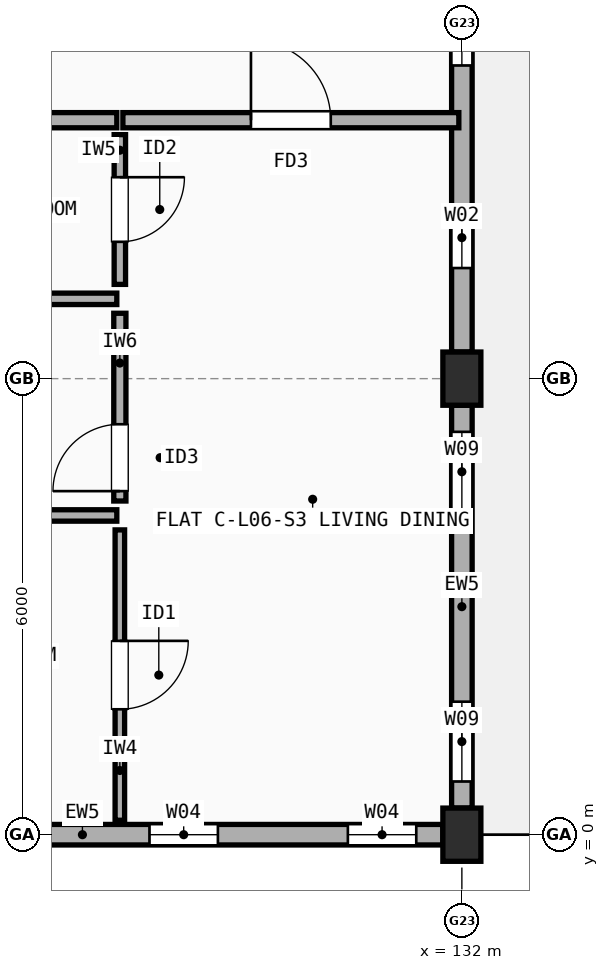
"""IFC4 building model, lengths in metres.
Left out: names, types, materials, properties, quantities, classifications, styles, units other than length and angle.
Written with IfcOpenShell. Run it as: python <this file> out.ifc"""

import sys

from ifc_helpers import new_model, si_unit, direction, frame, frame_2d, origin, origin_2d, place, context, subcontext, project, spatial, rectangle, extrude, element, fill, save


model = new_model("IFC4")
c1 = context("Model", 3, precision=1e-05, world=origin(), true_north=direction((0.0, 1.0)))
c2 = subcontext(c1, "Body", "Model", "MODEL_VIEW")
j1 = project(units=[si_unit("LENGTHUNIT", "METRE"), si_unit("PLANEANGLEUNIT", "RADIAN")], contexts=[c1])
p1 = place(None, origin())
s1 = spatial("IfcSite", under=j1, at=p1, CompositionType="ELEMENT")
p2 = place(p1, origin())
s2 = spatial("IfcBuilding", under=s1, at=p2, CompositionType="ELEMENT")
p3 = place(p2, frame((0.0, 0.0, 20.5)))
s3 = spatial("IfcBuildingStorey", under=s2, at=p3, CompositionType="ELEMENT", Elevation=20.5)
for number, where, z_axis, x_axis in (
    (1, (132.0, 0.0, 0.0), (0.0, 0.0, 1.0), (1.0, 0.0, 0.0)),
    (2, (132.0, 6.0, 0.0), (0.0, 0.0, 1.0), (1.0, 0.0, 0.0)),
):
    element("IfcColumn", number, at=place(p3, frame(where, z_axis=z_axis, x_axis=x_axis)), inside=s3, PredefinedType="COLUMN", context=c2, shape_type="SweptSolid", body=[
        extrude(rectangle(XDim=0.5, YDim=0.7, at=origin_2d()), origin(), (0.0, 0.0, 1.0), 2.97),
    ])
p4 = place(p3, frame((126.275, 0.0, 0.0), z_axis=(0.0, 0.0, 1.0), x_axis=(1.0, 0.0, 0.0)))
e3 = element("IfcWall", 3, at=p4, inside=s3, PredefinedType="STANDARD", context=c2, shape_type="SweptSolid", body=[
    extrude(rectangle(XDim=5.475, YDim=0.27, at=frame_2d((2.738, 0.0))), origin(), (0.0, 0.0, 1.0), 2.452),
])
p5 = place(p4, frame((1.615, 0.0, 0.9)))
e4 = element("IfcOpeningElement", 4, at=p5, cuts=e3, PredefinedType="OPENING", context=c2, shape_type="SweptSolid", body=[
    extrude(rectangle(XDim=0.9, YDim=1.3, at=frame_2d((0.45, 0.65))), frame((0.0, 0.145, 0.0), z_axis=(0.0, -1.0, 0.0), x_axis=(1.0, 0.0, 0.0)), (0.0, 0.0, 1.0), 0.29),
])
p6 = place(p4, frame((4.225, 0.0, 0.9)))
e5 = element("IfcOpeningElement", 5, at=p6, cuts=e3, PredefinedType="OPENING", context=c2, shape_type="SweptSolid", body=[
    extrude(rectangle(XDim=0.9, YDim=1.3, at=frame_2d((0.45, 0.65))), frame((0.0, 0.145, 0.0), z_axis=(0.0, -1.0, 0.0), x_axis=(1.0, 0.0, 0.0)), (0.0, 0.0, 1.0), 0.29),
])
p7 = place(p3, frame((132.0, 0.35, 0.0), z_axis=(0.0, 0.0, 1.0), x_axis=(0.0, 1.0, 0.0)))
e6 = element("IfcWall", 6, at=p7, inside=s3, PredefinedType="STANDARD", context=c2, shape_type="SweptSolid", body=[
    extrude(rectangle(XDim=5.3, YDim=0.27, at=frame_2d((2.65, 0.0))), origin(), (0.0, 0.0, 1.0), 2.452),
])
p8 = place(p7, frame((0.35, 0.0, 0.9)))
e7 = element("IfcOpeningElement", 7, at=p8, cuts=e6, PredefinedType="OPENING", context=c2, shape_type="SweptSolid", body=[
    extrude(rectangle(XDim=1.05, YDim=1.35, at=frame_2d((0.525, 0.675))), frame((0.0, 0.145, 0.0), z_axis=(0.0, -1.0, 0.0), x_axis=(1.0, 0.0, 0.0)), (0.0, 0.0, 1.0), 0.29),
])
p9 = place(p7, frame((3.9, 0.0, 0.9)))
e8 = element("IfcOpeningElement", 8, at=p9, cuts=e6, PredefinedType="OPENING", context=c2, shape_type="SweptSolid", body=[
    extrude(rectangle(XDim=1.05, YDim=1.35, at=frame_2d((0.525, 0.675))), frame((0.0, 0.145, 0.0), z_axis=(0.0, -1.0, 0.0), x_axis=(1.0, 0.0, 0.0)), (0.0, 0.0, 1.0), 0.29),
])
p10 = place(p3, frame((132.0, 6.35, 0.0), z_axis=(0.0, 0.0, 1.0), x_axis=(0.0, 1.0, 0.0)))
e9 = element("IfcWall", 9, at=p10, inside=s3, PredefinedType="STANDARD", context=c2, shape_type="SweptSolid", body=[
    extrude(rectangle(XDim=5.3, YDim=0.27, at=frame_2d((2.65, 0.0))), origin(), (0.0, 0.0, 1.0), 2.452),
])
p11 = place(p10, frame((1.105, 0.0, 0.9)))
e10 = element("IfcOpeningElement", 10, at=p11, cuts=e9, PredefinedType="OPENING", context=c2, shape_type="SweptSolid", body=[
    extrude(rectangle(XDim=0.8, YDim=1.2, at=frame_2d((0.4, 0.6))), frame((0.0, 0.145, 0.0), z_axis=(0.0, -1.0, 0.0), x_axis=(1.0, 0.0, 0.0)), (0.0, 0.0, 1.0), 0.29),
])
p12 = place(p10, frame((3.77, 0.0, 0.9)))
e11 = element("IfcOpeningElement", 11, at=p12, cuts=e9, PredefinedType="OPENING", context=c2, shape_type="SweptSolid", body=[
    extrude(rectangle(XDim=0.85, YDim=1.25, at=frame_2d((0.425, 0.625))), frame((0.0, 0.145, 0.0), z_axis=(0.0, -1.0, 0.0), x_axis=(1.0, 0.0, 0.0)), (0.0, 0.0, 1.0), 0.29),
])
p13 = place(p3, frame((123.04, 9.4, 0.0), z_axis=(0.0, 0.0, 1.0), x_axis=(1.0, 0.0, 0.0)))
e12 = element("IfcWall", 12, at=p13, inside=s3, PredefinedType="SOLIDWALL", context=c2, shape_type="SweptSolid", body=[
    extrude(rectangle(XDim=4.42, YDim=0.2, at=frame_2d((2.21, 0.0))), origin(), (0.0, 0.0, 1.0), 2.508),
])
p14 = place(p3, frame((127.54, 9.4, 0.0), z_axis=(0.0, 0.0, 1.0), x_axis=(1.0, 0.0, 0.0)))
e13 = element("IfcWall", 13, at=p14, inside=s3, PredefinedType="SOLIDWALL", context=c2, shape_type="SweptSolid", body=[
    extrude(rectangle(XDim=4.42, YDim=0.2, at=frame_2d((2.21, 0.0))), origin(), (0.0, 0.0, 1.0), 2.452),
])
p15 = place(p14, frame((1.685, 0.0, 0.0)))
e14 = element("IfcOpeningElement", 14, at=p15, cuts=e13, PredefinedType="OPENING", context=c2, shape_type="SweptSolid", body=[
    extrude(rectangle(XDim=1.05, YDim=2.15, at=frame_2d((0.525, 1.075))), frame((0.0, 0.11, 0.0), z_axis=(0.0, -1.0, 0.0), x_axis=(1.0, 0.0, 0.0)), (0.0, 0.0, 1.0), 0.22),
])
p16 = place(p3, frame((127.5, 0.19, 0.0), z_axis=(0.0, 0.0, 1.0), x_axis=(0.0, 1.0, 0.0)))
e15 = element("IfcWall", 15, at=p16, inside=s3, PredefinedType="PARTITIONING", context=c2, shape_type="SweptSolid", body=[
    extrude(rectangle(XDim=3.82, YDim=0.125, at=frame_2d((1.91, 0.0))), origin(), (0.0, 0.0, 1.0), 2.97),
])
p17 = place(p16, frame((1.46, 0.0, 0.0)))
e16 = element("IfcOpeningElement", 16, at=p17, cuts=e15, PredefinedType="OPENING", context=c2, shape_type="SweptSolid", body=[
    extrude(rectangle(XDim=0.9, YDim=2.1, at=frame_2d((0.45, 1.05))), frame((0.0, 0.073, 0.0), z_axis=(0.0, -1.0, 0.0), x_axis=(1.0, 0.0, 0.0)), (0.0, 0.0, 1.0), 0.145),
])
p18 = place(p3, frame((127.5, 4.39, 0.0), z_axis=(0.0, 0.0, 1.0), x_axis=(0.0, 1.0, 0.0)))
e17 = element("IfcWall", 17, at=p18, inside=s3, PredefinedType="PLUMBINGWALL", context=c2, shape_type="SweptSolid", body=[
    extrude(rectangle(XDim=2.47, YDim=0.16, at=frame_2d((1.235, 0.0))), origin(), (0.0, 0.0, 1.0), 2.452),
])
p19 = place(p18, frame((0.13, 0.0, 0.0)))
e18 = element("IfcOpeningElement", 18, at=p19, cuts=e17, PredefinedType="OPENING", context=c2, shape_type="SweptSolid", body=[
    extrude(rectangle(XDim=0.88, YDim=2.1, at=frame_2d((0.44, 1.05))), frame((0.0, 0.09, 0.0), z_axis=(0.0, -1.0, 0.0), x_axis=(1.0, 0.0, 0.0)), (0.0, 0.0, 1.0), 0.18),
])
p20 = place(p3, frame((127.5, 7.24, 0.0), z_axis=(0.0, 0.0, 1.0), x_axis=(0.0, 1.0, 0.0)))
e19 = element("IfcWall", 19, at=p20, inside=s3, PredefinedType="PARTITIONING", context=c2, shape_type="SweptSolid", body=[
    extrude(rectangle(XDim=1.97, YDim=0.15, at=frame_2d((0.985, 0.0))), origin(), (0.0, 0.0, 1.0), 2.97),
])
p21 = place(p20, frame((0.56, 0.0, 0.0)))
e20 = element("IfcOpeningElement", 20, at=p21, cuts=e19, PredefinedType="OPENING", context=c2, shape_type="SweptSolid", body=[
    extrude(rectangle(XDim=0.85, YDim=2.1, at=frame_2d((0.425, 1.05))), frame((0.0, 0.085, 0.0), z_axis=(0.0, -1.0, 0.0), x_axis=(1.0, 0.0, 0.0)), (0.0, 0.0, 1.0), 0.17),
])
p22 = place(p3, frame((123.04, 4.2, 0.0), z_axis=(0.0, 0.0, 1.0), x_axis=(1.0, 0.0, 0.0)))
e21 = element("IfcWall", 21, at=p22, inside=s3, PredefinedType="PARTITIONING", context=c2, shape_type="SweptSolid", body=[
    extrude(rectangle(XDim=4.42, YDim=0.15, at=frame_2d((2.21, 0.0))), origin(), (0.0, 0.0, 1.0), 2.548),
])
p23 = place(p3, frame((123.04, 7.05, 0.0), z_axis=(0.0, 0.0, 1.0), x_axis=(1.0, 0.0, 0.0)))
e22 = element("IfcWall", 22, at=p23, inside=s3, PredefinedType="PARTITIONING", context=c2, shape_type="SweptSolid", body=[
    extrude(rectangle(XDim=4.42, YDim=0.15, at=frame_2d((2.21, 0.0))), origin(), (0.0, 0.0, 1.0), 2.508),
])
p24 = place(p5, origin())
e23 = element("IfcWindow", 23, at=p24, inside=s3, PartitioningType="SINGLE_PANEL", PredefinedType="WINDOW", context=c2, shape_type="SweptSolid", body=[
    extrude(rectangle(XDim=0.9, YDim=1.3, at=frame_2d((0.45, 0.65))), frame((0.0, 0.03, 0.0), z_axis=(0.0, -1.0, 0.0), x_axis=(1.0, 0.0, 0.0)), (0.0, 0.0, 1.0), 0.06),
])
fill(e4, e23)
p25 = place(p6, origin())
e24 = element("IfcWindow", 24, at=p25, inside=s3, PartitioningType="SINGLE_PANEL", PredefinedType="WINDOW", context=c2, shape_type="SweptSolid", body=[
    extrude(rectangle(XDim=0.9, YDim=1.3, at=frame_2d((0.45, 0.65))), frame((0.0, 0.03, 0.0), z_axis=(0.0, -1.0, 0.0), x_axis=(1.0, 0.0, 0.0)), (0.0, 0.0, 1.0), 0.06),
])
fill(e5, e24)
p26 = place(p8, origin())
e25 = element("IfcWindow", 25, at=p26, inside=s3, PartitioningType="SINGLE_PANEL", PredefinedType="WINDOW", context=c2, shape_type="SweptSolid", body=[
    extrude(rectangle(XDim=1.05, YDim=1.35, at=frame_2d((0.525, 0.675))), frame((0.0, 0.03, 0.0), z_axis=(0.0, -1.0, 0.0), x_axis=(1.0, 0.0, 0.0)), (0.0, 0.0, 1.0), 0.06),
])
fill(e7, e25)
p27 = place(p9, origin())
e26 = element("IfcWindow", 26, at=p27, inside=s3, PartitioningType="SINGLE_PANEL", PredefinedType="WINDOW", context=c2, shape_type="SweptSolid", body=[
    extrude(rectangle(XDim=1.05, YDim=1.35, at=frame_2d((0.525, 0.675))), frame((0.0, 0.03, 0.0), z_axis=(0.0, -1.0, 0.0), x_axis=(1.0, 0.0, 0.0)), (0.0, 0.0, 1.0), 0.06),
])
fill(e8, e26)
p28 = place(p11, origin())
e27 = element("IfcWindow", 27, at=p28, inside=s3, PartitioningType="SINGLE_PANEL", PredefinedType="WINDOW", context=c2, shape_type="SweptSolid", body=[
    extrude(rectangle(XDim=0.8, YDim=1.2, at=frame_2d((0.4, 0.6))), frame((0.0, 0.03, 0.0), z_axis=(0.0, -1.0, 0.0), x_axis=(1.0, 0.0, 0.0)), (0.0, 0.0, 1.0), 0.06),
])
fill(e10, e27)
p29 = place(p12, origin())
e28 = element("IfcWindow", 28, at=p29, inside=s3, PartitioningType="SINGLE_PANEL", PredefinedType="WINDOW", context=c2, shape_type="SweptSolid", body=[
    extrude(rectangle(XDim=0.85, YDim=1.25, at=frame_2d((0.425, 0.625))), frame((0.0, 0.03, 0.0), z_axis=(0.0, -1.0, 0.0), x_axis=(1.0, 0.0, 0.0)), (0.0, 0.0, 1.0), 0.06),
])
fill(e11, e28)
p30 = place(p15, origin())
e29 = element("IfcDoor", 29, at=p30, inside=s3, OperationType="SINGLE_SWING_LEFT", PredefinedType="DOOR", context=c2, shape_type="SweptSolid", body=[
    extrude(rectangle(XDim=1.05, YDim=2.15, at=frame_2d((0.525, 1.075))), frame((0.0, 0.025, 0.0), z_axis=(0.0, -1.0, 0.0), x_axis=(1.0, 0.0, 0.0)), (0.0, 0.0, 1.0), 0.05),
])
fill(e14, e29)
p31 = place(p17, origin())
e30 = element("IfcDoor", 30, at=p31, inside=s3, OperationType="SINGLE_SWING_RIGHT", PredefinedType="DOOR", context=c2, shape_type="SweptSolid", body=[
    extrude(rectangle(XDim=0.9, YDim=2.1, at=frame_2d((0.45, 1.05))), frame((0.0, 0.025, 0.0), z_axis=(0.0, -1.0, 0.0), x_axis=(1.0, 0.0, 0.0)), (0.0, 0.0, 1.0), 0.05),
])
fill(e16, e30)
p32 = place(p19, origin())
e31 = element("IfcDoor", 31, at=p32, inside=s3, OperationType="SINGLE_SWING_LEFT", PredefinedType="DOOR", context=c2, shape_type="SweptSolid", body=[
    extrude(rectangle(XDim=0.88, YDim=2.1, at=frame_2d((0.44, 1.05))), frame((0.0, 0.025, 0.0), z_axis=(0.0, -1.0, 0.0), x_axis=(1.0, 0.0, 0.0)), (0.0, 0.0, 1.0), 0.05),
])
fill(e18, e31)
p33 = place(p21, origin())
e32 = element("IfcDoor", 32, at=p33, inside=s3, OperationType="SINGLE_SWING_RIGHT", PredefinedType="DOOR", context=c2, shape_type="SweptSolid", body=[
    extrude(rectangle(XDim=0.85, YDim=2.1, at=frame_2d((0.425, 1.05))), frame((0.0, 0.025, 0.0), z_axis=(0.0, -1.0, 0.0), x_axis=(1.0, 0.0, 0.0)), (0.0, 0.0, 1.0), 0.05),
])
fill(e20, e32)
save(model, sys.argv[1])
